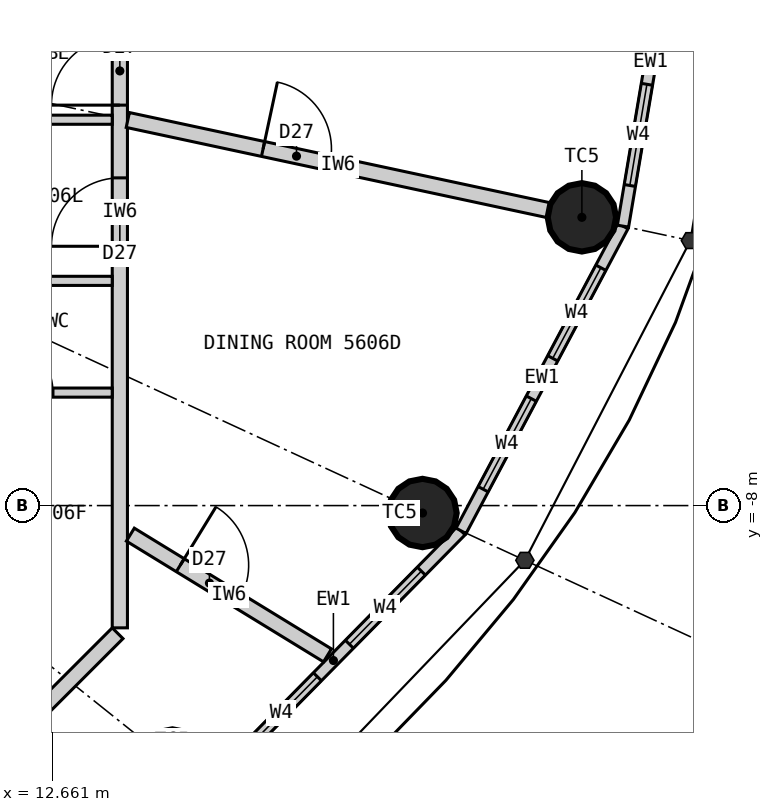
"""IFC4 building model, lengths in metres.
Left out: names, types, materials, properties, quantities, classifications, styles, units other than length and angle.
Written with IfcOpenShell. Run it as: python <this file> out.ifc"""

import sys

from ifc_helpers import new_model, si_unit, direction, frame, frame_2d, origin, origin_2d, place, context, subcontext, project, spatial, rectangle, circle, extrude, element, fill, save


model = new_model("IFC4")
c1 = context("Model", 3, precision=1e-05, world=origin(), true_north=direction((0.0, 1.0)))
c2 = subcontext(c1, "Body", "Model", "MODEL_VIEW")
j1 = project(units=[si_unit("LENGTHUNIT", "METRE"), si_unit("PLANEANGLEUNIT", "RADIAN")], contexts=[c1])
p1 = place(None, origin())
s1 = spatial("IfcSite", under=j1, at=p1, CompositionType="ELEMENT")
p2 = place(p1, origin())
s2 = spatial("IfcBuilding", under=s1, at=p2, CompositionType="ELEMENT")
p3 = place(p2, frame((0.0, 0.0, 209.4)))
s3 = spatial("IfcBuildingStorey", under=s2, at=p3, CompositionType="ELEMENT", Elevation=209.4)
for number, where, z_axis, x_axis in (
    (1, (14.241, -11.393, 0.0), (0.0, 0.0, 1.0), (1.0, 0.0, 0.0)),
    (2, (17.532, -8.098, 0.0), (0.0, 0.0, 1.0), (1.0, 0.0, 0.0)),
    (3, (19.629, -4.208, 0.0), (0.0, 0.0, 1.0), (1.0, 0.0, 0.0)),
):
    element("IfcColumn", number, at=place(p3, frame(where, z_axis=z_axis, x_axis=x_axis)), inside=s3, PredefinedType="COLUMN", context=c2, shape_type="SweptSolid", body=[
        extrude(circle(Radius=0.45, at=origin_2d()), origin(), (0.0, 0.0, 1.0), 3.3),
    ])
p4 = place(p3, frame((14.68, -11.744, 0.0), z_axis=(0.0, 0.0, 1.0), x_axis=(0.701527379618, 0.712642501993, 0.0)))
e4 = element("IfcWall", 4, at=p4, inside=s3, PredefinedType="ELEMENTEDWALL", context=c2, shape_type="SweptSolid", body=[
    extrude(rectangle(XDim=4.788, YDim=0.15, at=frame_2d((2.394, 0.0))), origin(), (0.0, 0.0, 1.0), 3.12),
])
p5 = place(p4, frame((0.744, 0.0, 0.9)))
e5 = element("IfcOpeningElement", 5, at=p5, cuts=e4, PredefinedType="OPENING", context=c2, shape_type="SweptSolid", body=[
    extrude(rectangle(XDim=1.35, YDim=1.9, at=frame_2d((0.675, 0.95))), frame((0.0, 0.085, 0.0), z_axis=(0.0, -1.0, 0.0), x_axis=(1.0, 0.0, 0.0)), (0.0, 0.0, 1.0), 0.17),
])
p6 = place(p4, frame((2.694, 0.0, 0.9)))
e6 = element("IfcOpeningElement", 6, at=p6, cuts=e4, PredefinedType="OPENING", context=c2, shape_type="SweptSolid", body=[
    extrude(rectangle(XDim=1.35, YDim=1.9, at=frame_2d((0.675, 0.95))), frame((0.0, 0.085, 0.0), z_axis=(0.0, -1.0, 0.0), x_axis=(1.0, 0.0, 0.0)), (0.0, 0.0, 1.0), 0.17),
])
p7 = place(p3, frame((18.04, -8.332, 0.0), z_axis=(0.0, 0.0, 1.0), x_axis=(0.469256152955, 0.883062094597, 0.0)))
e7 = element("IfcWall", 7, at=p7, inside=s3, PredefinedType="ELEMENTEDWALL", context=c2, shape_type="SweptSolid", body=[
    extrude(rectangle(XDim=4.539, YDim=0.15, at=frame_2d((2.27, 0.0))), origin(), (0.0, 0.0, 1.0), 3.12),
])
p8 = place(p7, frame((0.62, 0.0, 0.9)))
e8 = element("IfcOpeningElement", 8, at=p8, cuts=e7, PredefinedType="OPENING", context=c2, shape_type="SweptSolid", body=[
    extrude(rectangle(XDim=1.35, YDim=1.9, at=frame_2d((0.675, 0.95))), frame((0.0, 0.085, 0.0), z_axis=(0.0, -1.0, 0.0), x_axis=(1.0, 0.0, 0.0)), (0.0, 0.0, 1.0), 0.17),
])
p9 = place(p7, frame((2.57, 0.0, 0.9)))
e9 = element("IfcOpeningElement", 9, at=p9, cuts=e7, PredefinedType="OPENING", context=c2, shape_type="SweptSolid", body=[
    extrude(rectangle(XDim=1.35, YDim=1.9, at=frame_2d((0.675, 0.95))), frame((0.0, 0.085, 0.0), z_axis=(0.0, -1.0, 0.0), x_axis=(1.0, 0.0, 0.0)), (0.0, 0.0, 1.0), 0.17),
])
p10 = place(p3, frame((20.17, -4.323, 0.0), z_axis=(0.0, 0.0, 1.0), x_axis=(0.166538513568, 0.986034950445, 0.0)))
e10 = element("IfcWall", 10, at=p10, inside=s3, PredefinedType="ELEMENTEDWALL", context=c2, shape_type="SweptSolid", body=[
    extrude(rectangle(XDim=4.385, YDim=0.15, at=frame_2d((2.192, 0.0))), origin(), (0.0, 0.0, 1.0), 3.12),
])
p11 = place(p10, frame((0.542, 0.0, 0.9)))
e11 = element("IfcOpeningElement", 11, at=p11, cuts=e10, PredefinedType="OPENING", context=c2, shape_type="SweptSolid", body=[
    extrude(rectangle(XDim=1.35, YDim=1.9, at=frame_2d((0.675, 0.95))), frame((0.0, 0.085, 0.0), z_axis=(0.0, -1.0, 0.0), x_axis=(1.0, 0.0, 0.0)), (0.0, 0.0, 1.0), 0.17),
])
p12 = place(p10, frame((2.492, 0.0, 0.9)))
e12 = element("IfcOpeningElement", 12, at=p12, cuts=e10, PredefinedType="OPENING", context=c2, shape_type="SweptSolid", body=[
    extrude(rectangle(XDim=1.35, YDim=1.9, at=frame_2d((0.675, 0.95))), frame((0.0, 0.085, 0.0), z_axis=(0.0, -1.0, 0.0), x_axis=(1.0, 0.0, 0.0)), (0.0, 0.0, 1.0), 0.17),
])
p13 = place(p3, frame((10.679, -12.521, 0.0), z_axis=(0.0, 0.0, 1.0), x_axis=(0.707106781187, 0.707106781187, 0.0)))
e13 = element("IfcWall", 13, at=p13, inside=s3, PredefinedType="PARTITIONING", context=c2, shape_type="SweptSolid", body=[
    extrude(rectangle(XDim=4.019, YDim=0.2, at=frame_2d((2.009, 0.0))), origin(), (0.0, 0.0, 1.0), 3.12),
])
p14 = place(p3, frame((13.55, -9.609, 0.0), z_axis=(0.0, 0.0, 1.0), x_axis=(0.0, 1.0, 0.0)))
e14 = element("IfcWall", 14, at=p14, inside=s3, PredefinedType="PARTITIONING", context=c2, shape_type="SweptSolid", body=[
    extrude(rectangle(XDim=10.93, YDim=0.2, at=frame_2d((5.465, 0.0))), origin(), (0.0, 0.0, 1.0), 3.12),
])
p15 = place(p14, frame((5.02, 0.0, 0.0)))
e15 = element("IfcOpeningElement", 15, at=p15, cuts=e14, PredefinedType="OPENING", context=c2, shape_type="SweptSolid", body=[
    extrude(rectangle(XDim=0.9, YDim=2.1, at=frame_2d((0.45, 1.05))), frame((0.0, 0.11, 0.0), z_axis=(0.0, -1.0, 0.0), x_axis=(1.0, 0.0, 0.0)), (0.0, 0.0, 1.0), 0.22),
])
p16 = place(p14, frame((6.877, 0.0, 0.0)))
e16 = element("IfcOpeningElement", 16, at=p16, cuts=e14, PredefinedType="OPENING", context=c2, shape_type="SweptSolid", body=[
    extrude(rectangle(XDim=0.9, YDim=2.1, at=frame_2d((0.45, 1.05))), frame((0.0, 0.11, 0.0), z_axis=(0.0, -1.0, 0.0), x_axis=(1.0, 0.0, 0.0)), (0.0, 0.0, 1.0), 0.22),
])
p17 = place(p14, frame((8.565, 0.0, 0.0)))
e17 = element("IfcOpeningElement", 17, at=p17, cuts=e14, PredefinedType="OPENING", context=c2, shape_type="SweptSolid", body=[
    extrude(rectangle(XDim=0.8, YDim=2.1, at=frame_2d((0.4, 1.05))), frame((0.0, 0.11, 0.0), z_axis=(0.0, -1.0, 0.0), x_axis=(1.0, 0.0, 0.0)), (0.0, 0.0, 1.0), 0.22),
])
p18 = place(p3, frame((13.688, -8.382, 0.0), z_axis=(0.0, 0.0, 1.0), x_axis=(0.852783459586, -0.522264656144, 0.0)))
e18 = element("IfcWall", 18, at=p18, inside=s3, PredefinedType="PARTITIONING", context=c2, shape_type="SweptSolid", body=[
    extrude(rectangle(XDim=3.042, YDim=0.2, at=frame_2d((1.521, 0.0))), origin(), (0.0, 0.0, 1.0), 3.12),
])
p19 = place(p18, frame((0.77, 0.0, 0.0)))
e19 = element("IfcOpeningElement", 19, at=p19, cuts=e18, PredefinedType="OPENING", context=c2, shape_type="SweptSolid", body=[
    extrude(rectangle(XDim=0.9, YDim=2.1, at=frame_2d((0.45, 1.05))), frame((0.0, 0.11, 0.0), z_axis=(0.0, -1.0, 0.0), x_axis=(1.0, 0.0, 0.0)), (0.0, 0.0, 1.0), 0.22),
])
p20 = place(p3, frame((13.655, -2.927, 0.0), z_axis=(0.0, 0.0, 1.0), x_axis=(0.977790419294, -0.209585056568, 0.0)))
e20 = element("IfcWall", 20, at=p20, inside=s3, PredefinedType="PARTITIONING", context=c2, shape_type="SweptSolid", body=[
    extrude(rectangle(XDim=5.66, YDim=0.2, at=frame_2d((2.83, 0.0))), origin(), (0.0, 0.0, 1.0), 2.42),
])
p21 = place(p20, frame((1.82, 0.0, 0.0)))
e21 = element("IfcOpeningElement", 21, at=p21, cuts=e20, PredefinedType="OPENING", context=c2, shape_type="SweptSolid", body=[
    extrude(rectangle(XDim=0.9, YDim=2.1, at=frame_2d((0.45, 1.05))), frame((0.0, 0.11, 0.0), z_axis=(0.0, -1.0, 0.0), x_axis=(1.0, 0.0, 0.0)), (0.0, 0.0, 1.0), 0.22),
])
p22 = place(p3, frame((11.1, -6.514, 0.0), z_axis=(0.0, 0.0, 1.0), x_axis=(1.0, 0.0, 0.0)))
e22 = element("IfcWall", 22, at=p22, inside=s3, PredefinedType="PARTITIONING", context=c2, shape_type="SweptSolid", body=[
    extrude(rectangle(XDim=2.35, YDim=0.12, at=frame_2d((1.175, 0.0))), origin(), (0.0, 0.0, 1.0), 3.12),
])
p23 = place(p22, frame((0.77, 0.0, 0.0)))
e23 = element("IfcOpeningElement", 23, at=p23, cuts=e22, PredefinedType="OPENING", context=c2, shape_type="SweptSolid", body=[
    extrude(rectangle(XDim=0.8, YDim=2.1, at=frame_2d((0.4, 1.05))), frame((0.0, 0.07, 0.0), z_axis=(0.0, -1.0, 0.0), x_axis=(1.0, 0.0, 0.0)), (0.0, 0.0, 1.0), 0.14),
])
p24 = place(p3, frame((11.1, -5.044, 0.0), z_axis=(0.0, 0.0, 1.0), x_axis=(1.0, 0.0, 0.0)))
e24 = element("IfcWall", 24, at=p24, inside=s3, PredefinedType="PARTITIONING", context=c2, shape_type="SweptSolid", body=[
    extrude(rectangle(XDim=2.35, YDim=0.12, at=frame_2d((1.175, 0.0))), origin(), (0.0, 0.0, 1.0), 3.12),
])
p25 = place(p3, frame((11.1, -2.924, 0.0), z_axis=(0.0, 0.0, 1.0), x_axis=(1.0, 0.0, 0.0)))
e25 = element("IfcWall", 25, at=p25, inside=s3, PredefinedType="PARTITIONING", context=c2, shape_type="SweptSolid", body=[
    extrude(rectangle(XDim=2.35, YDim=0.12, at=frame_2d((1.175, 0.0))), origin(), (0.0, 0.0, 1.0), 2.42),
])
p26 = place(p5, origin())
e26 = element("IfcWindow", 26, at=p26, inside=s3, PartitioningType="SINGLE_PANEL", PredefinedType="WINDOW", context=c2, shape_type="SweptSolid", body=[
    extrude(rectangle(XDim=1.35, YDim=1.9, at=frame_2d((0.675, 0.95))), frame((0.0, 0.03, 0.0), z_axis=(0.0, -1.0, 0.0), x_axis=(1.0, 0.0, 0.0)), (0.0, 0.0, 1.0), 0.06),
])
fill(e5, e26)
p27 = place(p6, origin())
e27 = element("IfcWindow", 27, at=p27, inside=s3, PartitioningType="SINGLE_PANEL", PredefinedType="WINDOW", context=c2, shape_type="SweptSolid", body=[
    extrude(rectangle(XDim=1.35, YDim=1.9, at=frame_2d((0.675, 0.95))), frame((0.0, 0.03, 0.0), z_axis=(0.0, -1.0, 0.0), x_axis=(1.0, 0.0, 0.0)), (0.0, 0.0, 1.0), 0.06),
])
fill(e6, e27)
p28 = place(p8, origin())
e28 = element("IfcWindow", 28, at=p28, inside=s3, PartitioningType="SINGLE_PANEL", PredefinedType="WINDOW", context=c2, shape_type="SweptSolid", body=[
    extrude(rectangle(XDim=1.35, YDim=1.9, at=frame_2d((0.675, 0.95))), frame((0.0, 0.03, 0.0), z_axis=(0.0, -1.0, 0.0), x_axis=(1.0, 0.0, 0.0)), (0.0, 0.0, 1.0), 0.06),
])
fill(e8, e28)
p29 = place(p9, origin())
e29 = element("IfcWindow", 29, at=p29, inside=s3, PartitioningType="SINGLE_PANEL", PredefinedType="WINDOW", context=c2, shape_type="SweptSolid", body=[
    extrude(rectangle(XDim=1.35, YDim=1.9, at=frame_2d((0.675, 0.95))), frame((0.0, 0.03, 0.0), z_axis=(0.0, -1.0, 0.0), x_axis=(1.0, 0.0, 0.0)), (0.0, 0.0, 1.0), 0.06),
])
fill(e9, e29)
p30 = place(p11, origin())
e30 = element("IfcWindow", 30, at=p30, inside=s3, PartitioningType="SINGLE_PANEL", PredefinedType="WINDOW", context=c2, shape_type="SweptSolid", body=[
    extrude(rectangle(XDim=1.35, YDim=1.9, at=frame_2d((0.675, 0.95))), frame((0.0, 0.03, 0.0), z_axis=(0.0, -1.0, 0.0), x_axis=(1.0, 0.0, 0.0)), (0.0, 0.0, 1.0), 0.06),
])
fill(e11, e30)
p31 = place(p23, origin())
e31 = element("IfcDoor", 31, at=p31, inside=s3, OperationType="SINGLE_SWING_LEFT", PredefinedType="DOOR", context=c2, shape_type="SweptSolid", body=[
    extrude(rectangle(XDim=0.8, YDim=2.1, at=frame_2d((0.4, 1.05))), frame((0.0, 0.025, 0.0), z_axis=(0.0, -1.0, 0.0), x_axis=(1.0, 0.0, 0.0)), (0.0, 0.0, 1.0), 0.05),
])
fill(e23, e31)
p32 = place(p15, origin())
e32 = element("IfcDoor", 32, at=p32, inside=s3, OperationType="SINGLE_SWING_LEFT", PredefinedType="DOOR", context=c2, shape_type="SweptSolid", body=[
    extrude(rectangle(XDim=0.9, YDim=2.1, at=frame_2d((0.45, 1.05))), frame((0.0, 0.025, 0.0), z_axis=(0.0, -1.0, 0.0), x_axis=(1.0, 0.0, 0.0)), (0.0, 0.0, 1.0), 0.05),
])
fill(e15, e32)
p33 = place(p16, origin())
e33 = element("IfcDoor", 33, at=p33, inside=s3, OperationType="SINGLE_SWING_LEFT", PredefinedType="DOOR", context=c2, shape_type="SweptSolid", body=[
    extrude(rectangle(XDim=0.9, YDim=2.1, at=frame_2d((0.45, 1.05))), frame((0.0, 0.025, 0.0), z_axis=(0.0, -1.0, 0.0), x_axis=(1.0, 0.0, 0.0)), (0.0, 0.0, 1.0), 0.05),
])
fill(e16, e33)
p34 = place(p19, origin())
e34 = element("IfcDoor", 34, at=p34, inside=s3, OperationType="SINGLE_SWING_LEFT", PredefinedType="DOOR", context=c2, shape_type="SweptSolid", body=[
    extrude(rectangle(XDim=0.9, YDim=2.1, at=frame_2d((0.45, 1.05))), frame((0.0, 0.025, 0.0), z_axis=(0.0, -1.0, 0.0), x_axis=(1.0, 0.0, 0.0)), (0.0, 0.0, 1.0), 0.05),
])
fill(e19, e34)
p35 = place(p21, origin())
e35 = element("IfcDoor", 35, at=p35, inside=s3, OperationType="SINGLE_SWING_LEFT", PredefinedType="DOOR", context=c2, shape_type="SweptSolid", body=[
    extrude(rectangle(XDim=0.9, YDim=2.1, at=frame_2d((0.45, 1.05))), frame((0.0, 0.025, 0.0), z_axis=(0.0, -1.0, 0.0), x_axis=(1.0, 0.0, 0.0)), (0.0, 0.0, 1.0), 0.05),
])
fill(e21, e35)
save(model, sys.argv[1])
